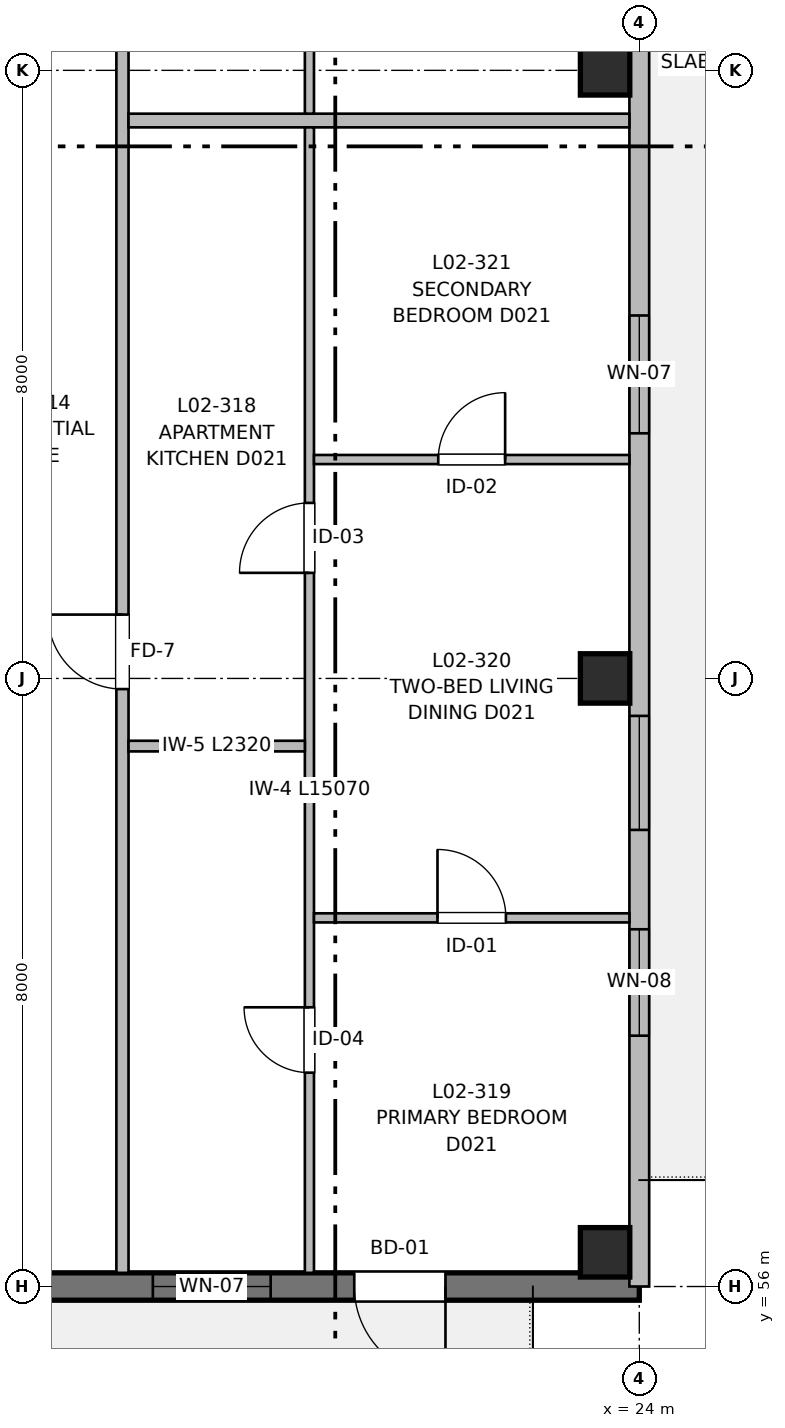
"""IFC4 building model, lengths in metres.
Left out: names, types, materials, properties, quantities, classifications, styles, units other than length and angle.
Written with IfcOpenShell. Run it as: python <this file> out.ifc"""

import sys

from ifc_helpers import new_model, si_unit, direction, frame, frame_2d, origin, origin_2d, place, context, subcontext, project, spatial, rectangle, extrude, element, fill, save


model = new_model("IFC4")
c1 = context("Model", 3, precision=1e-05, world=origin(), true_north=direction((0.0, 1.0)))
c2 = subcontext(c1, "Body", "Model", "MODEL_VIEW")
j1 = project(units=[si_unit("LENGTHUNIT", "METRE"), si_unit("PLANEANGLEUNIT", "RADIAN")], contexts=[c1])
p1 = place(None, origin())
s1 = spatial("IfcSite", under=j1, at=p1, CompositionType="ELEMENT")
p2 = place(p1, origin())
s2 = spatial("IfcBuilding", under=s1, at=p2, CompositionType="ELEMENT")
p3 = place(p2, frame((0.0, 0.0, 7.36)))
s3 = spatial("IfcBuildingStorey", under=s2, at=p3, CompositionType="ELEMENT", Elevation=7.36)
for number, where, z_axis, x_axis in (
    (1, (23.55, 56.45, 0.0), (0.0, 0.0, 1.0), (1.0, 0.0, 0.0)),
    (2, (23.55, 64.0, 0.0), (0.0, 0.0, 1.0), (1.0, 0.0, 0.0)),
    (3, (23.55, 72.0, 0.0), (0.0, 0.0, 1.0), (1.0, 0.0, 0.0)),
):
    element("IfcColumn", number, at=place(p3, frame(where, z_axis=z_axis, x_axis=x_axis)), inside=s3, PredefinedType="COLUMN", context=c2, shape_type="SweptSolid", body=[
        extrude(rectangle(XDim=0.65, YDim=0.65, at=origin_2d()), origin(), (0.0, 0.0, 1.0), 3.2),
    ])
p4 = place(p3, frame((24.0, 56.0, 0.0), z_axis=(0.0, 0.0, 1.0), x_axis=(-1.0, 0.0, 0.0)))
e4 = element("IfcWall", 4, at=p4, inside=s3, PredefinedType="SHEAR", context=c2, shape_type="SweptSolid", body=[
    extrude(rectangle(XDim=16.0, YDim=0.36, at=frame_2d((8.0, 0.0))), origin(), (0.0, 0.0, 1.0), 2.98),
])
p5 = place(p4, frame((2.55, 0.0, 0.0)))
e5 = element("IfcOpeningElement", 5, at=p5, cuts=e4, PredefinedType="OPENING", context=c2, shape_type="SweptSolid", body=[
    extrude(rectangle(XDim=1.2, YDim=2.2, at=frame_2d((0.6, 1.1))), frame((0.0, 0.19, 0.0), z_axis=(0.0, -1.0, 0.0), x_axis=(1.0, 0.0, 0.0)), (0.0, 0.0, 1.0), 0.38),
])
p6 = place(p4, frame((4.85, 0.0, 0.82)))
e6 = element("IfcOpeningElement", 6, at=p6, cuts=e4, PredefinedType="OPENING", context=c2, shape_type="SweptSolid", body=[
    extrude(rectangle(XDim=1.55, YDim=1.4, at=frame_2d((0.775, 0.7))), frame((0.0, 0.19, 0.0), z_axis=(0.0, -1.0, 0.0), x_axis=(1.0, 0.0, 0.0)), (0.0, 0.0, 1.0), 0.38),
])
p7 = place(p4, frame((11.25, 0.0, 0.82)))
e7 = element("IfcOpeningElement", 7, at=p7, cuts=e4, PredefinedType="OPENING", context=c2, shape_type="SweptSolid", body=[
    extrude(rectangle(XDim=1.5, YDim=1.4, at=frame_2d((0.75, 0.7))), frame((0.0, 0.19, 0.0), z_axis=(0.0, -1.0, 0.0), x_axis=(1.0, 0.0, 0.0)), (0.0, 0.0, 1.0), 0.38),
])
p8 = place(p3, frame((24.0, 88.0, 0.0), z_axis=(0.0, 0.0, 1.0), x_axis=(0.0, -1.0, 0.0)))
e8 = element("IfcWall", 8, at=p8, inside=s3, PredefinedType="SOLIDWALL", context=c2, shape_type="SweptSolid", body=[
    extrude(rectangle(XDim=32.0, YDim=0.26, at=frame_2d((16.0, 0.0))), origin(), (0.0, 0.0, 1.0), 2.98),
])
p9 = place(p8, frame((3.4, 0.0, 0.0)))
e9 = element("IfcOpeningElement", 9, at=p9, cuts=e8, PredefinedType="OPENING", context=c2, shape_type="SweptSolid", body=[
    extrude(rectangle(XDim=1.2, YDim=2.2, at=frame_2d((0.6, 1.1))), frame((0.0, 0.14, 0.0), z_axis=(0.0, -1.0, 0.0), x_axis=(1.0, 0.0, 0.0)), (0.0, 0.0, 1.0), 0.28),
])
p10 = place(p8, frame((4.85, 0.0, 0.82)))
e10 = element("IfcOpeningElement", 10, at=p10, cuts=e8, PredefinedType="OPENING", context=c2, shape_type="SweptSolid", body=[
    extrude(rectangle(XDim=1.55, YDim=1.4, at=frame_2d((0.775, 0.7))), frame((0.0, 0.14, 0.0), z_axis=(0.0, -1.0, 0.0), x_axis=(1.0, 0.0, 0.0)), (0.0, 0.0, 1.0), 0.28),
])
p11 = place(p8, frame((10.4, 0.0, 0.82)))
e11 = element("IfcOpeningElement", 11, at=p11, cuts=e8, PredefinedType="OPENING", context=c2, shape_type="SweptSolid", body=[
    extrude(rectangle(XDim=1.5, YDim=1.4, at=frame_2d((0.75, 0.7))), frame((0.0, 0.14, 0.0), z_axis=(0.0, -1.0, 0.0), x_axis=(1.0, 0.0, 0.0)), (0.0, 0.0, 1.0), 0.28),
])
p12 = place(p8, frame((19.225, 0.0, 0.82)))
e12 = element("IfcOpeningElement", 12, at=p12, cuts=e8, PredefinedType="OPENING", context=c2, shape_type="SweptSolid", body=[
    extrude(rectangle(XDim=1.55, YDim=1.4, at=frame_2d((0.775, 0.7))), frame((0.0, 0.14, 0.0), z_axis=(0.0, -1.0, 0.0), x_axis=(1.0, 0.0, 0.0)), (0.0, 0.0, 1.0), 0.28),
])
p13 = place(p8, frame((27.3, 0.0, 0.87)))
e13 = element("IfcOpeningElement", 13, at=p13, cuts=e8, PredefinedType="OPENING", context=c2, shape_type="SweptSolid", body=[
    extrude(rectangle(XDim=1.4, YDim=1.35, at=frame_2d((0.7, 0.675))), frame((0.0, 0.14, 0.0), z_axis=(0.0, -1.0, 0.0), x_axis=(1.0, 0.0, 0.0)), (0.0, 0.0, 1.0), 0.28),
])
p14 = place(p8, frame((24.493, 0.0, 0.82)))
e14 = element("IfcOpeningElement", 14, at=p14, cuts=e8, PredefinedType="OPENING", context=c2, shape_type="SweptSolid", body=[
    extrude(rectangle(XDim=1.5, YDim=1.4, at=frame_2d((0.75, 0.7))), frame((0.0, 0.14, 0.0), z_axis=(0.0, -1.0, 0.0), x_axis=(1.0, 0.0, 0.0)), (0.0, 0.0, 1.0), 0.28),
])
p15 = place(p8, frame((13.68, 0.0, 0.82)))
e15 = element("IfcOpeningElement", 15, at=p15, cuts=e8, PredefinedType="OPENING", context=c2, shape_type="SweptSolid", body=[
    extrude(rectangle(XDim=1.5, YDim=1.4, at=frame_2d((0.75, 0.7))), frame((0.0, 0.14, 0.0), z_axis=(0.0, -1.0, 0.0), x_axis=(1.0, 0.0, 0.0)), (0.0, 0.0, 1.0), 0.28),
])
p16 = place(p8, frame((0.55, 0.0, 0.82)))
e16 = element("IfcOpeningElement", 16, at=p16, cuts=e8, PredefinedType="OPENING", context=c2, shape_type="SweptSolid", body=[
    extrude(rectangle(XDim=1.5, YDim=1.4, at=frame_2d((0.75, 0.7))), frame((0.0, 0.14, 0.0), z_axis=(0.0, -1.0, 0.0), x_axis=(1.0, 0.0, 0.0)), (0.0, 0.0, 1.0), 0.28),
])
p17 = place(p3, frame((17.2, 56.18, 0.0), z_axis=(0.0, 0.0, 1.0), x_axis=(0.0, 1.0, 0.0)))
e17 = element("IfcWall", 17, at=p17, inside=s3, PredefinedType="PARTITIONING", context=c2, shape_type="SweptSolid", body=[
    extrude(rectangle(XDim=50.62, YDim=0.16, at=frame_2d((25.31, 0.0))), origin(), (0.0, 0.0, 1.0), 2.935),
])
p18 = place(p17, frame((7.68, 0.0, 0.0)))
e18 = element("IfcOpeningElement", 18, at=p18, cuts=e17, PredefinedType="OPENING", context=c2, shape_type="SweptSolid", body=[
    extrude(rectangle(XDim=0.98, YDim=2.15, at=frame_2d((0.49, 1.075))), frame((0.0, 0.09, 0.0), z_axis=(0.0, -1.0, 0.0), x_axis=(1.0, 0.0, 0.0)), (0.0, 0.0, 1.0), 0.18),
])
p19 = place(p17, frame((22.43, 0.0, 0.0)))
e19 = element("IfcOpeningElement", 19, at=p19, cuts=e17, PredefinedType="OPENING", context=c2, shape_type="SweptSolid", body=[
    extrude(rectangle(XDim=0.98, YDim=2.15, at=frame_2d((0.49, 1.075))), frame((0.0, 0.09, 0.0), z_axis=(0.0, -1.0, 0.0), x_axis=(1.0, 0.0, 0.0)), (0.0, 0.0, 1.0), 0.18),
])
p20 = place(p17, frame((35.65, 0.0, 0.0)))
e20 = element("IfcOpeningElement", 20, at=p20, cuts=e17, PredefinedType="OPENING", context=c2, shape_type="SweptSolid", body=[
    extrude(rectangle(XDim=0.98, YDim=2.15, at=frame_2d((0.49, 1.075))), frame((0.0, 0.09, 0.0), z_axis=(0.0, -1.0, 0.0), x_axis=(1.0, 0.0, 0.0)), (0.0, 0.0, 1.0), 0.18),
])
p21 = place(p17, frame((46.42, 0.0, 0.0)))
e21 = element("IfcOpeningElement", 21, at=p21, cuts=e17, PredefinedType="OPENING", context=c2, shape_type="SweptSolid", body=[
    extrude(rectangle(XDim=0.98, YDim=2.15, at=frame_2d((0.49, 1.075))), frame((0.0, 0.09, 0.0), z_axis=(0.0, -1.0, 0.0), x_axis=(1.0, 0.0, 0.0)), (0.0, 0.0, 1.0), 0.18),
])
p22 = place(p3, frame((17.28, 71.34, 0.0), z_axis=(0.0, 0.0, 1.0), x_axis=(1.0, 0.0, 0.0)))
e22 = element("IfcWall", 22, at=p22, inside=s3, PredefinedType="PARTITIONING", context=c2, shape_type="SweptSolid", body=[
    extrude(rectangle(XDim=6.59, YDim=0.18, at=frame_2d((3.295, 0.0))), origin(), (0.0, 0.0, 1.0), 2.935),
])
p23 = place(p3, frame((19.66, 56.18, 0.0), z_axis=(0.0, 0.0, 1.0), x_axis=(0.0, 1.0, 0.0)))
e23 = element("IfcWall", 23, at=p23, inside=s3, PredefinedType="PARTITIONING", context=c2, shape_type="SweptSolid", body=[
    extrude(rectangle(XDim=15.07, YDim=0.12, at=frame_2d((7.535, 0.0))), origin(), (0.0, 0.0, 1.0), 2.935),
])
p24 = place(p23, frame((2.633, 0.0, 0.0)))
e24 = element("IfcOpeningElement", 24, at=p24, cuts=e23, PredefinedType="OPENING", context=c2, shape_type="SweptSolid", body=[
    extrude(rectangle(XDim=0.86, YDim=2.1, at=frame_2d((0.43, 1.05))), frame((0.0, 0.07, 0.0), z_axis=(0.0, -1.0, 0.0), x_axis=(1.0, 0.0, 0.0)), (0.0, 0.0, 1.0), 0.14),
])
p25 = place(p23, frame((9.209, 0.0, 0.0)))
e25 = element("IfcOpeningElement", 25, at=p25, cuts=e23, PredefinedType="OPENING", context=c2, shape_type="SweptSolid", body=[
    extrude(rectangle(XDim=0.92, YDim=2.1, at=frame_2d((0.46, 1.05))), frame((0.0, 0.07, 0.0), z_axis=(0.0, -1.0, 0.0), x_axis=(1.0, 0.0, 0.0)), (0.0, 0.0, 1.0), 0.14),
])
p26 = place(p3, frame((17.28, 63.11, 0.0), z_axis=(0.0, 0.0, 1.0), x_axis=(1.0, 0.0, 0.0)))
e26 = element("IfcWall", 26, at=p26, inside=s3, PredefinedType="PARTITIONING", context=c2, shape_type="SweptSolid", body=[
    extrude(rectangle(XDim=2.32, YDim=0.14, at=frame_2d((1.16, 0.0))), origin(), (0.0, 0.0, 1.0), 2.935),
])
p27 = place(p3, frame((19.72, 60.85, 0.0), z_axis=(0.0, 0.0, 1.0), x_axis=(1.0, 0.0, 0.0)))
e27 = element("IfcWall", 27, at=p27, inside=s3, PredefinedType="PARTITIONING", context=c2, shape_type="SweptSolid", body=[
    extrude(rectangle(XDim=4.15, YDim=0.12, at=frame_2d((2.075, 0.0))), origin(), (0.0, 0.0, 1.0), 2.935),
])
p28 = place(p27, frame((1.625, 0.0, 0.0)))
e28 = element("IfcOpeningElement", 28, at=p28, cuts=e27, PredefinedType="OPENING", context=c2, shape_type="SweptSolid", body=[
    extrude(rectangle(XDim=0.9, YDim=2.1, at=frame_2d((0.45, 1.05))), frame((0.0, 0.07, 0.0), z_axis=(0.0, -1.0, 0.0), x_axis=(1.0, 0.0, 0.0)), (0.0, 0.0, 1.0), 0.14),
])
p29 = place(p3, frame((19.72, 66.88, 0.0), z_axis=(0.0, 0.0, 1.0), x_axis=(1.0, 0.0, 0.0)))
e29 = element("IfcWall", 29, at=p29, inside=s3, PredefinedType="PARTITIONING", context=c2, shape_type="SweptSolid", body=[
    extrude(rectangle(XDim=4.15, YDim=0.12, at=frame_2d((2.075, 0.0))), origin(), (0.0, 0.0, 1.0), 2.935),
])
p30 = place(p29, frame((1.635, 0.0, 0.0)))
e30 = element("IfcOpeningElement", 30, at=p30, cuts=e29, PredefinedType="OPENING", context=c2, shape_type="SweptSolid", body=[
    extrude(rectangle(XDim=0.88, YDim=2.1, at=frame_2d((0.44, 1.05))), frame((0.0, 0.07, 0.0), z_axis=(0.0, -1.0, 0.0), x_axis=(1.0, 0.0, 0.0)), (0.0, 0.0, 1.0), 0.14),
])
p31 = place(p3, frame((19.66, 71.43, 0.0), z_axis=(0.0, 0.0, 1.0), x_axis=(0.0, 1.0, 0.0)))
e31 = element("IfcWall", 31, at=p31, inside=s3, PredefinedType="PARTITIONING", context=c2, shape_type="SweptSolid", body=[
    extrude(rectangle(XDim=13.97, YDim=0.12, at=frame_2d((6.985, 0.0))), origin(), (0.0, 0.0, 1.0), 2.935),
])
p32 = place(p31, frame((2.443, 0.0, 0.0)))
e32 = element("IfcOpeningElement", 32, at=p32, cuts=e31, PredefinedType="OPENING", context=c2, shape_type="SweptSolid", body=[
    extrude(rectangle(XDim=0.86, YDim=2.1, at=frame_2d((0.43, 1.05))), frame((0.0, 0.07, 0.0), z_axis=(0.0, -1.0, 0.0), x_axis=(1.0, 0.0, 0.0)), (0.0, 0.0, 1.0), 0.14),
])
p33 = place(p31, frame((8.541, 0.0, 0.0)))
e33 = element("IfcOpeningElement", 33, at=p33, cuts=e31, PredefinedType="OPENING", context=c2, shape_type="SweptSolid", body=[
    extrude(rectangle(XDim=0.92, YDim=2.1, at=frame_2d((0.46, 1.05))), frame((0.0, 0.07, 0.0), z_axis=(0.0, -1.0, 0.0), x_axis=(1.0, 0.0, 0.0)), (0.0, 0.0, 1.0), 0.14),
])
p34 = place(p5, origin())
e34 = element("IfcDoor", 34, at=p34, inside=s3, OperationType="SINGLE_SWING_LEFT", PredefinedType="DOOR", context=c2, shape_type="SweptSolid", body=[
    extrude(rectangle(XDim=1.2, YDim=2.2, at=frame_2d((0.6, 1.1))), frame((0.0, 0.025, 0.0), z_axis=(0.0, -1.0, 0.0), x_axis=(1.0, 0.0, 0.0)), (0.0, 0.0, 1.0), 0.05),
])
fill(e5, e34)
p35 = place(p6, origin())
e35 = element("IfcWindow", 35, at=p35, inside=s3, PartitioningType="SINGLE_PANEL", PredefinedType="WINDOW", context=c2, shape_type="SweptSolid", body=[
    extrude(rectangle(XDim=1.55, YDim=1.4, at=frame_2d((0.775, 0.7))), frame((0.0, 0.03, 0.0), z_axis=(0.0, -1.0, 0.0), x_axis=(1.0, 0.0, 0.0)), (0.0, 0.0, 1.0), 0.06),
])
fill(e6, e35)
p36 = place(p12, origin())
e36 = element("IfcWindow", 36, at=p36, inside=s3, PartitioningType="SINGLE_PANEL", PredefinedType="WINDOW", context=c2, shape_type="SweptSolid", body=[
    extrude(rectangle(XDim=1.55, YDim=1.4, at=frame_2d((0.775, 0.7))), frame((0.0, 0.03, 0.0), z_axis=(0.0, -1.0, 0.0), x_axis=(1.0, 0.0, 0.0)), (0.0, 0.0, 1.0), 0.06),
])
fill(e12, e36)
p37 = place(p13, origin())
e37 = element("IfcWindow", 37, at=p37, inside=s3, PartitioningType="SINGLE_PANEL", PredefinedType="WINDOW", context=c2, shape_type="SweptSolid", body=[
    extrude(rectangle(XDim=1.4, YDim=1.35, at=frame_2d((0.7, 0.675))), frame((0.0, 0.03, 0.0), z_axis=(0.0, -1.0, 0.0), x_axis=(1.0, 0.0, 0.0)), (0.0, 0.0, 1.0), 0.06),
])
fill(e13, e37)
p38 = place(p24, origin())
e38 = element("IfcDoor", 38, at=p38, inside=s3, OperationType="SINGLE_SWING_RIGHT", PredefinedType="DOOR", context=c2, shape_type="SweptSolid", body=[
    extrude(rectangle(XDim=0.86, YDim=2.1, at=frame_2d((0.43, 1.05))), frame((0.0, 0.025, 0.0), z_axis=(0.0, -1.0, 0.0), x_axis=(1.0, 0.0, 0.0)), (0.0, 0.0, 1.0), 0.05),
])
fill(e24, e38)
p39 = place(p25, origin())
e39 = element("IfcDoor", 39, at=p39, inside=s3, OperationType="SINGLE_SWING_LEFT", PredefinedType="DOOR", context=c2, shape_type="SweptSolid", body=[
    extrude(rectangle(XDim=0.92, YDim=2.1, at=frame_2d((0.46, 1.05))), frame((0.0, 0.025, 0.0), z_axis=(0.0, -1.0, 0.0), x_axis=(1.0, 0.0, 0.0)), (0.0, 0.0, 1.0), 0.05),
])
fill(e25, e39)
p40 = place(p18, origin())
e40 = element("IfcDoor", 40, at=p40, inside=s3, OperationType="SINGLE_SWING_RIGHT", PredefinedType="DOOR", context=c2, shape_type="SweptSolid", body=[
    extrude(rectangle(XDim=0.98, YDim=2.15, at=frame_2d((0.49, 1.075))), frame((0.0, 0.025, 0.0), z_axis=(0.0, -1.0, 0.0), x_axis=(1.0, 0.0, 0.0)), (0.0, 0.0, 1.0), 0.05),
])
fill(e18, e40)
p41 = place(p28, origin())
e41 = element("IfcDoor", 41, at=p41, inside=s3, OperationType="SINGLE_SWING_LEFT", PredefinedType="DOOR", context=c2, shape_type="SweptSolid", body=[
    extrude(rectangle(XDim=0.9, YDim=2.1, at=frame_2d((0.45, 1.05))), frame((0.0, 0.025, 0.0), z_axis=(0.0, -1.0, 0.0), x_axis=(1.0, 0.0, 0.0)), (0.0, 0.0, 1.0), 0.05),
])
fill(e28, e41)
p42 = place(p30, origin())
e42 = element("IfcDoor", 42, at=p42, inside=s3, OperationType="SINGLE_SWING_RIGHT", PredefinedType="DOOR", context=c2, shape_type="SweptSolid", body=[
    extrude(rectangle(XDim=0.88, YDim=2.1, at=frame_2d((0.44, 1.05))), frame((0.0, 0.025, 0.0), z_axis=(0.0, -1.0, 0.0), x_axis=(1.0, 0.0, 0.0)), (0.0, 0.0, 1.0), 0.05),
])
fill(e30, e42)
p43 = place(p14, origin())
e43 = element("IfcWindow", 43, at=p43, inside=s3, PartitioningType="SINGLE_PANEL", PredefinedType="WINDOW", context=c2, shape_type="SweptSolid", body=[
    extrude(rectangle(XDim=1.5, YDim=1.4, at=frame_2d((0.75, 0.7))), frame((0.0, 0.03, 0.0), z_axis=(0.0, -1.0, 0.0), x_axis=(1.0, 0.0, 0.0)), (0.0, 0.0, 1.0), 0.06),
])
fill(e14, e43)
save(model, sys.argv[1])
